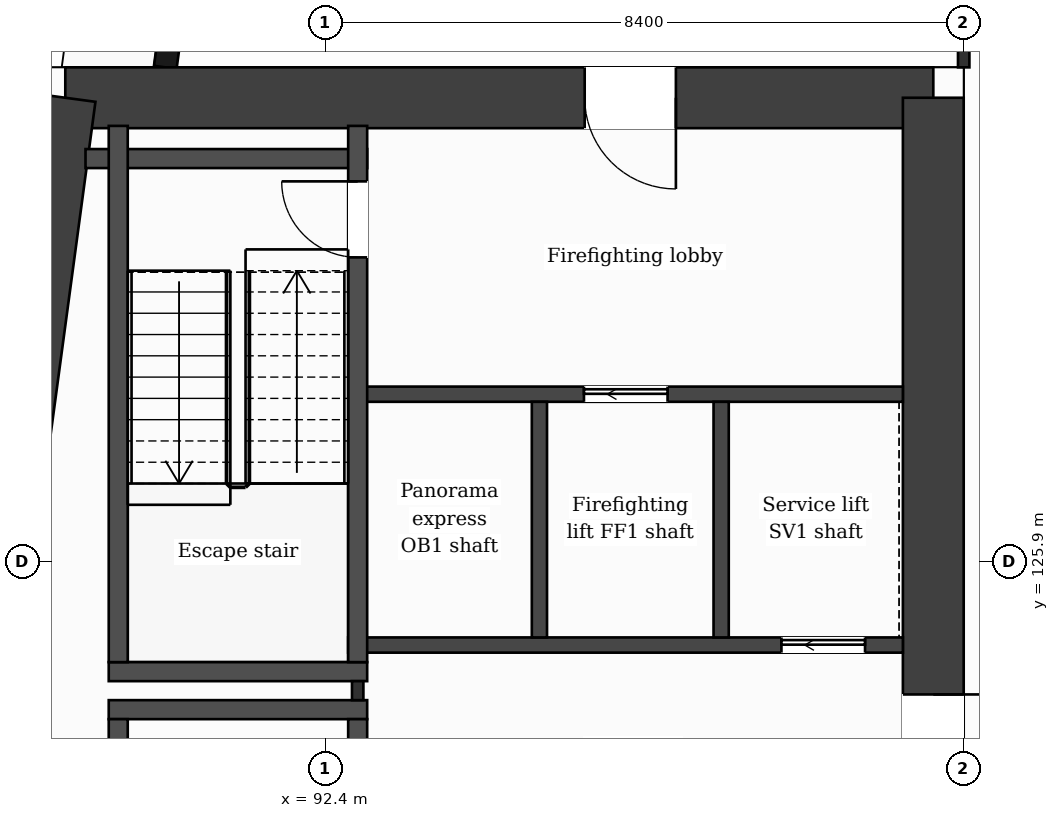
"""IFC4 building model, lengths in metres.
Left out: names, types, materials, properties, quantities, classifications, styles, units other than length and angle.
Written with IfcOpenShell. Run it as: python <this file> out.ifc"""

import sys

from ifc_helpers import new_model, si_unit, direction, frame, frame_2d, origin, place, context, subcontext, project, spatial, rectangle, extrude, element, fill, save


model = new_model("IFC4")
c1 = context("Model", 3, precision=1e-05, world=origin(), true_north=direction((0.0, 1.0)))
c2 = subcontext(c1, "Body", "Model", "MODEL_VIEW")
j1 = project(units=[si_unit("LENGTHUNIT", "METRE"), si_unit("PLANEANGLEUNIT", "RADIAN")], contexts=[c1])
p1 = place(None, origin())
s1 = spatial("IfcSite", under=j1, at=p1, CompositionType="ELEMENT")
p2 = place(p1, origin())
s2 = spatial("IfcBuilding", under=s1, at=p2, CompositionType="ELEMENT")
p3 = place(p2, frame((0.0, 0.0, 242.9)))
s3 = spatial("IfcBuildingStorey", under=s2, at=p3, CompositionType="ELEMENT", Elevation=242.9)
p4 = place(p3, frame((88.98, 132.0, 0.0), z_axis=(0.0, 0.0, 1.0), x_axis=(1.0, 0.0, 0.0)))
e1 = element("IfcWall", 1, at=p4, inside=s3, PredefinedType="SHEAR", context=c2, shape_type="SweptSolid", body=[
    extrude(rectangle(XDim=11.419, YDim=0.8, at=frame_2d((5.71, 0.0))), origin(), (0.0, 0.0, 1.0), 3.7),
])
p5 = place(p4, frame((6.833, 0.0, 0.0)))
e2 = element("IfcOpeningElement", 2, at=p5, cuts=e1, PredefinedType="OPENING", context=c2, shape_type="SweptSolid", body=[
    extrude(rectangle(XDim=1.2, YDim=2.1, at=frame_2d((0.6, 1.05))), frame((0.0, 0.41, 0.0), z_axis=(0.0, -1.0, 0.0), x_axis=(1.0, 0.0, 0.0)), (0.0, 0.0, 1.0), 0.82),
])
p6 = place(p3, frame((100.4, 132.0, 0.0), z_axis=(0.0, 0.0, 1.0), x_axis=(0.0, -1.0, 0.0)))
e3 = element("IfcWall", 3, at=p6, inside=s3, PredefinedType="SHEAR", context=c2, shape_type="SweptSolid", body=[
    extrude(rectangle(XDim=21.2, YDim=0.8, at=frame_2d((10.6, 0.0))), origin(), (0.0, 0.0, 1.0), 3.7),
])
p7 = place(p6, frame((7.85, 0.0, 0.0)))
e4 = element("IfcOpeningElement", 4, at=p7, cuts=e3, PredefinedType="OPENING", context=c2, shape_type="SweptSolid", body=[
    extrude(rectangle(XDim=1.4, YDim=2.1, at=frame_2d((0.7, 1.05))), frame((0.0, 0.41, 0.0), z_axis=(0.0, -1.0, 0.0), x_axis=(1.0, 0.0, 0.0)), (0.0, 0.0, 1.0), 0.82),
])
p8 = place(p3, frame((86.127, 110.8, 0.0), z_axis=(0.0, 0.0, 1.0), x_axis=(0.133408347329, 0.991061154956, 0.0)))
e5 = element("IfcWall", 5, at=p8, inside=s3, PredefinedType="SHEAR", context=c2, shape_type="SweptSolid", body=[
    extrude(rectangle(XDim=21.391, YDim=0.8, at=frame_2d((10.696, 0.0))), origin(), (0.0, 0.0, 1.0), 3.7),
])
p9 = place(p3, frame((91.177, 138.95, 0.0), z_axis=(0.0, 0.0, 1.0), x_axis=(-0.133426664613, -0.991058689065, 0.0)))
e6 = element("IfcWall", 6, at=p9, inside=s3, PredefinedType="SOLIDWALL", context=c2, shape_type="SweptSolid", body=[
    extrude(rectangle(XDim=6.609, YDim=0.3, at=frame_2d((3.305, 0.0))), origin(), (0.0, 0.0, 1.0), 3.2),
])
p10 = place(p9, frame((1.039, 0.0, 0.9)))
e7 = element("IfcOpeningElement", 7, at=p10, cuts=e6, PredefinedType="OPENING", context=c2, shape_type="SweptSolid", body=[
    extrude(rectangle(XDim=1.2, YDim=2.1, at=frame_2d((0.6, 1.05))), frame((0.0, 0.16, 0.0), z_axis=(0.0, -1.0, 0.0), x_axis=(1.0, 0.0, 0.0)), (0.0, 0.0, 1.0), 0.32),
])
p11 = place(p9, frame((4.294, 0.0, 0.0)))
e8 = element("IfcOpeningElement", 8, at=p11, cuts=e6, PredefinedType="OPENING", context=c2, shape_type="SweptSolid", body=[
    extrude(rectangle(XDim=1.2, YDim=2.4, at=frame_2d((0.6, 1.2))), frame((0.0, 0.16, 0.0), z_axis=(0.0, -1.0, 0.0), x_axis=(1.0, 0.0, 0.0)), (0.0, 0.0, 1.0), 0.32),
])
for number, where, z_axis, x_axis in (
    (9, (89.552, 123.95, 0.0), (0.0, 0.0, 1.0), (1.0, 0.0, 0.0)),
    (10, (89.552, 124.45, 0.0), (0.0, 0.0, 1.0), (1.0, 0.0, 0.0)),
):
    element("IfcWall", number, at=place(p3, frame(where, z_axis=z_axis, x_axis=x_axis)), inside=s3, PredefinedType="PARTITIONING", context=c2, shape_type="SweptSolid", body=[
        extrude(rectangle(XDim=3.4, YDim=0.25, at=frame_2d((1.7, 0.0))), origin(), (0.0, 0.0, 1.0), 3.2),
    ])
p12 = place(p3, frame((92.702, 124.8, 0.0), z_axis=(0.0, 0.0, 1.0), x_axis=(1.0, 0.0, 0.0)))
e11 = element("IfcWall", 11, at=p12, inside=s3, PredefinedType="PARTITIONING", context=c2, shape_type="SweptSolid", body=[
    extrude(rectangle(XDim=7.298, YDim=0.2, at=frame_2d((3.649, 0.0))), origin(), (0.0, 0.0, 1.0), 3.2),
])
p13 = place(p12, frame((5.7, 0.0, 0.0)))
e12 = element("IfcOpeningElement", 12, at=p13, cuts=e11, PredefinedType="OPENING", context=c2, shape_type="SweptSolid", body=[
    extrude(rectangle(XDim=1.1, YDim=2.1, at=frame_2d((0.55, 1.05))), frame((0.0, 0.11, 0.0), z_axis=(0.0, -1.0, 0.0), x_axis=(1.0, 0.0, 0.0)), (0.0, 0.0, 1.0), 0.22),
])
p14 = place(p3, frame((92.827, 128.1, 0.0), z_axis=(0.0, 0.0, 1.0), x_axis=(1.0, 0.0, 0.0)))
e13 = element("IfcWall", 13, at=p14, inside=s3, PredefinedType="PARTITIONING", context=c2, shape_type="SweptSolid", body=[
    extrude(rectangle(XDim=7.173, YDim=0.2, at=frame_2d((3.586, 0.0))), origin(), (0.0, 0.0, 1.0), 3.2),
])
p15 = place(p14, frame((2.977, 0.0, 0.0)))
e14 = element("IfcOpeningElement", 14, at=p15, cuts=e13, PredefinedType="OPENING", context=c2, shape_type="SweptSolid", body=[
    extrude(rectangle(XDim=1.1, YDim=2.1, at=frame_2d((0.55, 1.05))), frame((0.0, 0.11, 0.0), z_axis=(0.0, -1.0, 0.0), x_axis=(1.0, 0.0, 0.0)), (0.0, 0.0, 1.0), 0.22),
])
p16 = place(p3, frame((89.246, 131.2, 0.0), z_axis=(0.0, 0.0, 1.0), x_axis=(1.0, 0.0, 0.0)))
e15 = element("IfcWall", 15, at=p16, inside=s3, PredefinedType="PARTITIONING", context=c2, shape_type="SweptSolid", body=[
    extrude(rectangle(XDim=3.706, YDim=0.25, at=frame_2d((1.853, 0.0))), origin(), (0.0, 0.0, 1.0), 3.2),
])
for number, where, z_axis, x_axis in (
    (16, (89.677, 116.77, 0.0), (0.0, 0.0, 1.0), (0.0, 1.0, 0.0)),
    (17, (89.677, 124.575, 0.0), (0.0, 0.0, 1.0), (0.0, 1.0, 0.0)),
):
    element("IfcWall", number, at=place(p3, frame(where, z_axis=z_axis, x_axis=x_axis)), inside=s3, PredefinedType="PARTITIONING", context=c2, shape_type="SweptSolid", body=[
        extrude(rectangle(XDim=7.055, YDim=0.25, at=frame_2d((3.527, 0.0))), origin(), (0.0, 0.0, 1.0), 3.2),
    ])
p17 = place(p3, frame((92.827, 124.075, 0.0), z_axis=(0.0, 0.0, 1.0), x_axis=(0.0, 1.0, 0.0)))
e18 = element("IfcWall", 18, at=p17, inside=s3, PredefinedType="PARTITIONING", context=c2, shape_type="SweptSolid", body=[
    extrude(rectangle(XDim=0.25, YDim=0.15, at=frame_2d((0.125, 0.0))), origin(), (0.0, 0.0, 1.0), 3.2),
])
p18 = place(p3, frame((92.827, 116.77, 0.0), z_axis=(0.0, 0.0, 1.0), x_axis=(0.0, 1.0, 0.0)))
e19 = element("IfcWall", 19, at=p18, inside=s3, PredefinedType="PARTITIONING", context=c2, shape_type="SweptSolid", body=[
    extrude(rectangle(XDim=7.055, YDim=0.25, at=frame_2d((3.527, 0.0))), origin(), (0.0, 0.0, 1.0), 3.2),
])
p19 = place(p18, frame((5.755, 0.0, 0.0)))
e20 = element("IfcOpeningElement", 20, at=p19, cuts=e19, PredefinedType="OPENING", context=c2, shape_type="SweptSolid", body=[
    extrude(rectangle(XDim=0.95, YDim=2.1, at=frame_2d((0.475, 1.05))), frame((0.0, 0.135, 0.0), z_axis=(0.0, -1.0, 0.0), x_axis=(1.0, 0.0, 0.0)), (0.0, 0.0, 1.0), 0.27),
])
p20 = place(p3, frame((92.827, 124.575, 0.0), z_axis=(0.0, 0.0, 1.0), x_axis=(0.0, 1.0, 0.0)))
e21 = element("IfcWall", 21, at=p20, inside=s3, PredefinedType="PARTITIONING", context=c2, shape_type="SweptSolid", body=[
    extrude(rectangle(XDim=7.055, YDim=0.25, at=frame_2d((3.527, 0.0))), origin(), (0.0, 0.0, 1.0), 3.2),
])
p21 = place(p20, frame((5.325, 0.0, 0.0)))
e22 = element("IfcOpeningElement", 22, at=p21, cuts=e21, PredefinedType="OPENING", context=c2, shape_type="SweptSolid", body=[
    extrude(rectangle(XDim=1.0, YDim=2.1, at=frame_2d((0.5, 1.05))), frame((0.0, 0.135, 0.0), z_axis=(0.0, -1.0, 0.0), x_axis=(1.0, 0.0, 0.0)), (0.0, 0.0, 1.0), 0.27),
])
for number, where, z_axis, x_axis in (
    (23, (95.218, 124.9, 0.0), (0.0, 0.0, 1.0), (0.0, 1.0, 0.0)),
    (24, (97.609, 124.9, 0.0), (0.0, 0.0, 1.0), (0.0, 1.0, 0.0)),
):
    element("IfcWall", number, at=place(p3, frame(where, z_axis=z_axis, x_axis=x_axis)), inside=s3, PredefinedType="PARTITIONING", context=c2, shape_type="SweptSolid", body=[
        extrude(rectangle(XDim=3.1, YDim=0.2, at=frame_2d((1.55, 0.0))), origin(), (0.0, 0.0, 1.0), 3.2),
    ])
p22 = place(p3, frame((100.8, 132.4, 0.0), z_axis=(0.0, 0.0, 1.0), x_axis=(0.0, 1.0, 0.0)))
e25 = element("IfcWall", 25, at=p22, inside=s3, PredefinedType="PARTITIONING", context=c2, shape_type="SweptSolid", body=[
    extrude(rectangle(XDim=1.325, YDim=0.15, at=frame_2d((0.663, 0.0))), origin(), (0.0, 0.0, 1.0), 3.2),
])
p23 = place(p15, origin())
e26 = element("IfcDoor", 26, at=p23, inside=s3, OperationType="SLIDING_TO_LEFT", PredefinedType="DOOR", context=c2, shape_type="SweptSolid", body=[
    extrude(rectangle(XDim=1.1, YDim=2.1, at=frame_2d((0.55, 1.05))), frame((0.0, 0.025, 0.0), z_axis=(0.0, -1.0, 0.0), x_axis=(1.0, 0.0, 0.0)), (0.0, 0.0, 1.0), 0.05),
])
fill(e14, e26)
p24 = place(p13, origin())
e27 = element("IfcDoor", 27, at=p24, inside=s3, OperationType="SLIDING_TO_LEFT", PredefinedType="DOOR", context=c2, shape_type="SweptSolid", body=[
    extrude(rectangle(XDim=1.1, YDim=2.1, at=frame_2d((0.55, 1.05))), frame((0.0, 0.025, 0.0), z_axis=(0.0, -1.0, 0.0), x_axis=(1.0, 0.0, 0.0)), (0.0, 0.0, 1.0), 0.05),
])
fill(e12, e27)
p25 = place(p21, origin())
e28 = element("IfcDoor", 28, at=p25, inside=s3, OperationType="SINGLE_SWING_RIGHT", PredefinedType="DOOR", context=c2, shape_type="SweptSolid", body=[
    extrude(rectangle(XDim=1.0, YDim=2.1, at=frame_2d((0.5, 1.05))), frame((0.0, 0.025, 0.0), z_axis=(0.0, -1.0, 0.0), x_axis=(1.0, 0.0, 0.0)), (0.0, 0.0, 1.0), 0.05),
])
fill(e22, e28)
p26 = place(p5, origin())
e29 = element("IfcDoor", 29, at=p26, inside=s3, OperationType="SINGLE_SWING_RIGHT", PredefinedType="DOOR", context=c2, shape_type="SweptSolid", body=[
    extrude(rectangle(XDim=1.2, YDim=2.1, at=frame_2d((0.6, 1.05))), frame((0.0, 0.025, 0.0), z_axis=(0.0, -1.0, 0.0), x_axis=(1.0, 0.0, 0.0)), (0.0, 0.0, 1.0), 0.05),
])
fill(e2, e29)
p27 = place(p7, origin())
e30 = element("IfcDoor", 30, at=p27, inside=s3, OperationType="SINGLE_SWING_LEFT", PredefinedType="DOOR", context=c2, shape_type="SweptSolid", body=[
    extrude(rectangle(XDim=1.4, YDim=2.1, at=frame_2d((0.7, 1.05))), frame((0.0, 0.025, 0.0), z_axis=(0.0, -1.0, 0.0), x_axis=(1.0, 0.0, 0.0)), (0.0, 0.0, 1.0), 0.05),
])
fill(e4, e30)
save(model, sys.argv[1])
